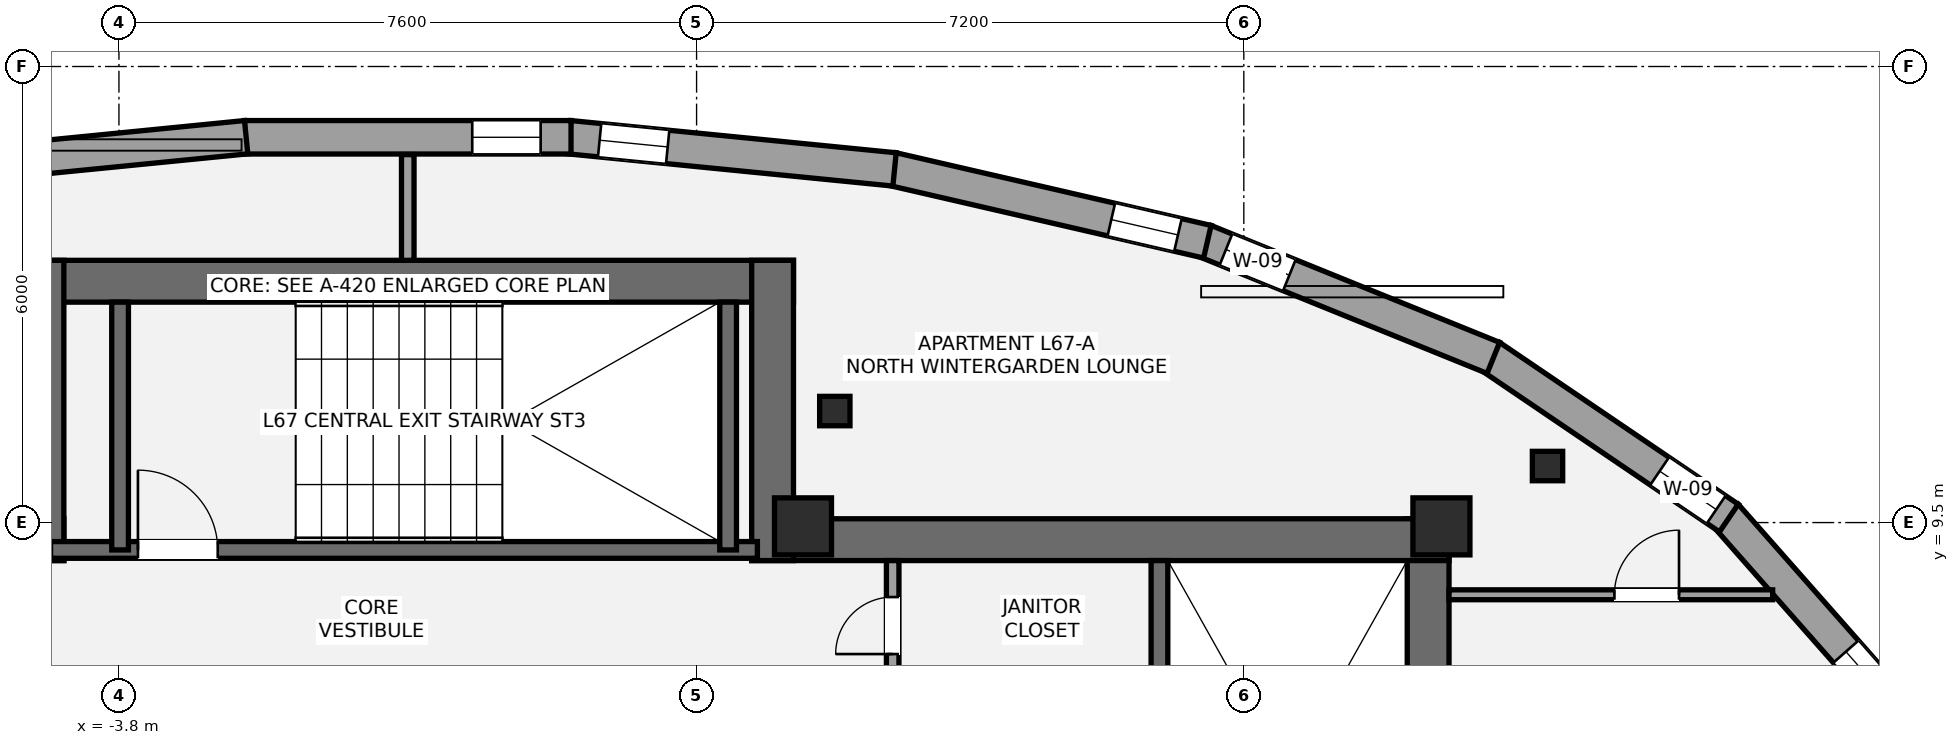
"""IFC4 building model, lengths in metres.
Left out: names, types, materials, properties, quantities, classifications, styles, units other than length and angle.
Written with IfcOpenShell. Run it as: python <this file> out.ifc"""

import sys

from ifc_helpers import new_model, si_unit, direction, frame, frame_2d, origin, origin_2d, place, context, subcontext, project, spatial, rectangle, i_section, extrude, element, fill, save


model = new_model("IFC4")
c1 = context("Model", 3, precision=1e-05, world=origin(), true_north=direction((0.0, 1.0)))
c2 = subcontext(c1, "Body", "Model", "MODEL_VIEW")
j1 = project(units=[si_unit("LENGTHUNIT", "METRE"), si_unit("PLANEANGLEUNIT", "RADIAN")], contexts=[c1])
p1 = place(None, origin())
s1 = spatial("IfcSite", under=j1, at=p1, CompositionType="ELEMENT")
p2 = place(p1, origin())
s2 = spatial("IfcBuilding", under=s1, at=p2, CompositionType="ELEMENT")
p3 = place(p2, frame((0.0, 0.0, 238.35)))
s3 = spatial("IfcBuildingStorey", under=s2, at=p3, CompositionType="ELEMENT", Elevation=238.35)
p4 = place(p3, frame((-13.7, 9.275, 0.0), z_axis=(0.0, 0.0, 1.0), x_axis=(1.0, 0.0, 0.0)))
e1 = element("IfcWall", 1, at=p4, inside=s3, PredefinedType="SHEAR", context=c2, shape_type="SweptSolid", body=[
    extrude(rectangle(XDim=9.175, YDim=0.55, at=frame_2d((4.587, 0.0))), origin(), (0.0, 0.0, 1.0), 3.15),
])
p5 = place(p3, frame((13.425, 1.3, 0.0), z_axis=(0.0, 0.0, 1.0), x_axis=(0.0, 1.0, 0.0)))
e2 = element("IfcWall", 2, at=p5, inside=s3, PredefinedType="SHEAR", context=c2, shape_type="SweptSolid", body=[
    extrude(rectangle(XDim=8.25, YDim=0.55, at=frame_2d((4.125, 0.0))), origin(), (0.0, 0.0, 1.0), 3.15),
])
p6 = place(p3, frame((4.525, 9.275, 0.0), z_axis=(0.0, 0.0, 1.0), x_axis=(1.0, 0.0, 0.0)))
e3 = element("IfcWall", 3, at=p6, inside=s3, PredefinedType="SHEAR", context=c2, shape_type="SweptSolid", body=[
    extrude(rectangle(XDim=9.175, YDim=0.55, at=frame_2d((4.587, 0.0))), origin(), (0.0, 0.0, 1.0), 3.15),
])
p7 = place(p3, frame((9.89, 1.85, 0.0), z_axis=(0.0, 0.0, 1.0), x_axis=(0.0, 1.0, 0.0)))
e4 = element("IfcWall", 4, at=p7, inside=s3, PredefinedType="SHEAR", context=c2, shape_type="SweptSolid", body=[
    extrude(rectangle(XDim=7.15, YDim=0.22, at=frame_2d((3.575, 0.0))), origin(), (0.0, 0.0, 1.0), 3.15),
])
p8 = place(p3, frame((-5.075, 12.675, 0.0), z_axis=(0.0, 0.0, 1.0), x_axis=(1.0, 0.0, 0.0)))
e5 = element("IfcWall", 5, at=p8, inside=s3, PredefinedType="SHEAR", context=c2, shape_type="SweptSolid", body=[
    extrude(rectangle(XDim=10.15, YDim=0.55, at=frame_2d((5.075, 0.0))), origin(), (0.0, 0.0, 1.0), 3.15),
])
for number, where, z_axis, x_axis in (
    (6, (-4.8, 9.0, 0.0), (0.0, 0.0, 1.0), (0.0, 1.0, 0.0)),
    (7, (4.8, 9.0, 0.0), (0.0, 0.0, 1.0), (0.0, 1.0, 0.0)),
):
    element("IfcWall", number, at=place(p3, frame(where, z_axis=z_axis, x_axis=x_axis)), inside=s3, PredefinedType="SHEAR", context=c2, shape_type="SweptSolid", body=[
        extrude(rectangle(XDim=3.95, YDim=0.55, at=frame_2d((1.975, 0.0))), origin(), (0.0, 0.0, 1.0), 3.15),
    ])
p9 = place(p3, frame((-4.7, 9.14, 0.0), z_axis=(0.0, 0.0, 1.0), x_axis=(1.0, 0.0, 0.0)))
e8 = element("IfcWall", 8, at=p9, inside=s3, PredefinedType="SHEAR", context=c2, shape_type="SweptSolid", body=[
    extrude(rectangle(XDim=9.3, YDim=0.22, at=frame_2d((4.65, 0.0))), origin(), (0.0, 0.0, 1.0), 3.15),
])
p10 = place(p9, frame((1.15, 0.0, 0.0)))
e9 = element("IfcOpeningElement", 9, at=p10, cuts=e8, PredefinedType="OPENING", context=c2, shape_type="SweptSolid", body=[
    extrude(rectangle(XDim=1.05, YDim=2.15, at=frame_2d((0.525, 1.075))), frame((0.0, 0.12, 0.0), z_axis=(0.0, -1.0, 0.0), x_axis=(1.0, 0.0, 0.0)), (0.0, 0.0, 1.0), 0.24),
])
for number, where, z_axis, x_axis in (
    (10, (-3.785, 9.14, 0.0), (0.0, 0.0, 1.0), (0.0, 1.0, 0.0)),
    (11, (4.215, 9.14, 0.0), (0.0, 0.0, 1.0), (0.0, 1.0, 0.0)),
):
    element("IfcWall", number, at=place(p3, frame(where, z_axis=z_axis, x_axis=x_axis)), inside=s3, PredefinedType="SHEAR", context=c2, shape_type="SweptSolid", body=[
        extrude(rectangle(XDim=3.26, YDim=0.22, at=frame_2d((1.63, 0.0))), origin(), (0.0, 0.0, 1.0), 3.15),
    ])
for number, where, z_axis, x_axis in (
    (12, (5.2, 9.45, 0.0), (0.0, 0.0, 1.0), (1.0, 0.0, 0.0)),
    (13, (13.6, 9.45, 0.0), (0.0, 0.0, 1.0), (1.0, 0.0, 0.0)),
):
    element("IfcColumn", number, at=place(p3, frame(where, z_axis=z_axis, x_axis=x_axis)), inside=s3, PredefinedType="PILASTER", context=c2, shape_type="SweptSolid", body=[
        extrude(rectangle(XDim=0.75, YDim=0.75, at=origin_2d()), origin(), (0.0, 0.0, 1.0), 3.15),
    ])
for number, where, z_axis, x_axis in (
    (14, (14.996, 10.244, 0.0), (0.0, 0.0, 1.0), (1.0, 0.0, 0.0)),
    (15, (5.619, 10.967, 0.0), (0.0, 0.0, 1.0), (1.0, 0.0, 0.0)),
):
    element("IfcColumn", number, at=place(p3, frame(where, z_axis=z_axis, x_axis=x_axis)), inside=s3, PredefinedType="COLUMN", context=c2, shape_type="SweptSolid", body=[
        extrude(i_section(OverallWidth=0.399, OverallDepth=0.387, WebThickness=0.021, FlangeThickness=0.033, at=origin_2d()), origin(), (0.0, 0.0, 1.0), 3.15),
    ])
p11 = place(p3, frame((17.34, 9.596, 0.0), z_axis=(0.0, 0.0, 1.0), x_axis=(0.66136043846, -0.750068243855, 0.0)))
e16 = element("IfcWall", 16, at=p11, inside=s3, PredefinedType="STANDARD", context=c2, shape_type="SweptSolid", body=[
    extrude(rectangle(XDim=3.432, YDim=0.44, at=frame_2d((1.716, 0.0))), origin(), (0.0, 0.0, 1.0), 2.336),
])
p12 = place(p11, frame((2.392, 0.0, 0.88)))
e17 = element("IfcOpeningElement", 17, at=p12, cuts=e16, PredefinedType="OPENING", context=c2, shape_type="SweptSolid", body=[
    extrude(rectangle(XDim=0.9, YDim=1.35, at=frame_2d((0.45, 0.675))), frame((0.0, 0.23, 0.0), z_axis=(0.0, -1.0, 0.0), x_axis=(1.0, 0.0, 0.0)), (0.0, 0.0, 1.0), 0.46),
])
p13 = place(p3, frame((14.242, 11.688, 0.0), z_axis=(0.0, 0.0, 1.0), x_axis=(0.827637036896, -0.561263694851, 0.0)))
e18 = element("IfcWall", 18, at=p13, inside=s3, PredefinedType="STANDARD", context=c2, shape_type="SweptSolid", body=[
    extrude(rectangle(XDim=3.793, YDim=0.44, at=frame_2d((1.896, 0.0))), origin(), (0.0, 0.0, 1.0), 2.336),
])
p14 = place(p13, frame((2.693, 0.0, 0.58)))
e19 = element("IfcOpeningElement", 19, at=p14, cuts=e18, PredefinedType="OPENING", context=c2, shape_type="SweptSolid", body=[
    extrude(rectangle(XDim=0.9, YDim=1.35, at=frame_2d((0.45, 0.675))), frame((0.0, 0.23, 0.0), z_axis=(0.0, -1.0, 0.0), x_axis=(1.0, 0.0, 0.0)), (0.0, 0.0, 1.0), 0.46),
])
p15 = place(p3, frame((10.487, 13.205, 0.0), z_axis=(0.0, 0.0, 1.0), x_axis=(0.926731976866, -0.375723093586, 0.0)))
e20 = element("IfcWall", 20, at=p15, inside=s3, PredefinedType="STANDARD", context=c2, shape_type="SweptSolid", body=[
    extrude(rectangle(XDim=4.096, YDim=0.44, at=frame_2d((2.048, 0.0))), origin(), (0.0, 0.0, 1.0), 2.336),
])
p16 = place(p15, frame((0.3, 0.0, 0.58)))
e21 = element("IfcOpeningElement", 21, at=p16, cuts=e20, PredefinedType="OPENING", context=c2, shape_type="SweptSolid", body=[
    extrude(rectangle(XDim=0.9, YDim=1.35, at=frame_2d((0.45, 0.675))), frame((0.0, 0.23, 0.0), z_axis=(0.0, -1.0, 0.0), x_axis=(1.0, 0.0, 0.0)), (0.0, 0.0, 1.0), 0.46),
])
p17 = place(p3, frame((6.377, 14.151, 0.0), z_axis=(0.0, 0.0, 1.0), x_axis=(0.974398936081, -0.224825962391, 0.0)))
e22 = element("IfcWall", 22, at=p17, inside=s3, PredefinedType="STANDARD", context=c2, shape_type="SweptSolid", body=[
    extrude(rectangle(XDim=4.252, YDim=0.44, at=frame_2d((2.126, 0.0))), origin(), (0.0, 0.0, 1.0), 2.336),
])
p18 = place(p17, frame((2.956, 0.0, 0.58)))
e23 = element("IfcOpeningElement", 23, at=p18, cuts=e22, PredefinedType="OPENING", context=c2, shape_type="SweptSolid", body=[
    extrude(rectangle(XDim=0.9, YDim=1.35, at=frame_2d((0.45, 0.675))), frame((0.0, 0.23, 0.0), z_axis=(0.0, -1.0, 0.0), x_axis=(1.0, 0.0, 0.0)), (0.0, 0.0, 1.0), 0.46),
])
p19 = place(p3, frame((2.126, 14.57, 0.0), z_axis=(0.0, 0.0, 1.0), x_axis=(0.995134540264, -0.098525361068, 0.0)))
e24 = element("IfcWall", 24, at=p19, inside=s3, PredefinedType="STANDARD", context=c2, shape_type="SweptSolid", body=[
    extrude(rectangle(XDim=4.299, YDim=0.44, at=frame_2d((2.15, 0.0))), origin(), (0.0, 0.0, 1.0), 2.336),
])
p20 = place(p19, frame((0.4, 0.0, 0.58)))
e25 = element("IfcOpeningElement", 25, at=p20, cuts=e24, PredefinedType="OPENING", context=c2, shape_type="SweptSolid", body=[
    extrude(rectangle(XDim=0.9, YDim=1.35, at=frame_2d((0.45, 0.675))), frame((0.0, 0.23, 0.0), z_axis=(0.0, -1.0, 0.0), x_axis=(1.0, 0.0, 0.0)), (0.0, 0.0, 1.0), 0.46),
])
p21 = place(p3, frame((-2.148, 14.569, 0.0), z_axis=(0.0, 0.0, 1.0), x_axis=(1.0, 0.0, 0.0)))
e26 = element("IfcWall", 26, at=p21, inside=s3, PredefinedType="STANDARD", context=c2, shape_type="SweptSolid", body=[
    extrude(rectangle(XDim=4.296, YDim=0.44, at=frame_2d((2.148, 0.0))), origin(), (0.0, 0.0, 1.0), 2.336),
])
p22 = place(p21, frame((2.996, 0.0, 0.58)))
e27 = element("IfcOpeningElement", 27, at=p22, cuts=e26, PredefinedType="OPENING", context=c2, shape_type="SweptSolid", body=[
    extrude(rectangle(XDim=0.9, YDim=1.35, at=frame_2d((0.45, 0.675))), frame((0.0, 0.23, 0.0), z_axis=(0.0, -1.0, 0.0), x_axis=(1.0, 0.0, 0.0)), (0.0, 0.0, 1.0), 0.46),
])
p23 = place(p3, frame((-6.405, 14.146, 0.0), z_axis=(0.0, 0.0, 1.0), x_axis=(0.995134540264, 0.098525361068, 0.0)))
e28 = element("IfcWall", 28, at=p23, inside=s3, PredefinedType="STANDARD", context=c2, shape_type="SweptSolid", body=[
    extrude(rectangle(XDim=4.299, YDim=0.44, at=frame_2d((2.15, 0.0))), origin(), (0.0, 0.0, 1.0), 2.336),
])
p24 = place(p23, frame((0.4, 0.0, 0.58)))
e29 = element("IfcOpeningElement", 29, at=p24, cuts=e28, PredefinedType="OPENING", context=c2, shape_type="SweptSolid", body=[
    extrude(rectangle(XDim=0.9, YDim=1.35, at=frame_2d((0.45, 0.675))), frame((0.0, 0.23, 0.0), z_axis=(0.0, -1.0, 0.0), x_axis=(1.0, 0.0, 0.0)), (0.0, 0.0, 1.0), 0.46),
])
p25 = place(p3, frame((6.38, 7.42, 0.0), z_axis=(0.0, 0.0, 1.0), x_axis=(0.0, 1.0, 0.0)))
e30 = element("IfcWall", 30, at=p25, inside=s3, PredefinedType="PARTITIONING", context=c2, shape_type="SweptSolid", body=[
    extrude(rectangle(XDim=1.58, YDim=0.165, at=frame_2d((0.79, 0.0))), origin(), (0.0, 0.0, 1.0), 2.97),
])
p26 = place(p25, frame((0.35, 0.0, 0.0)))
e31 = element("IfcOpeningElement", 31, at=p26, cuts=e30, PredefinedType="OPENING", context=c2, shape_type="SweptSolid", body=[
    extrude(rectangle(XDim=0.75, YDim=2.1, at=frame_2d((0.375, 1.05))), frame((0.0, 0.093, 0.0), z_axis=(0.0, -1.0, 0.0), x_axis=(1.0, 0.0, 0.0)), (0.0, 0.0, 1.0), 0.185),
])
p27 = place(p3, frame((0.0, 12.95, 0.0), z_axis=(0.0, 0.0, 1.0), x_axis=(0.0, 1.0, 0.0)))
e32 = element("IfcWall", 32, at=p27, inside=s3, PredefinedType="PARTITIONING", context=c2, shape_type="SweptSolid", body=[
    extrude(rectangle(XDim=1.391, YDim=0.165, at=frame_2d((0.695, 0.0))), origin(), (0.0, 0.0, 1.0), 2.97),
])
p28 = place(p3, frame((13.7, 8.55, 0.0), z_axis=(0.0, 0.0, 1.0), x_axis=(1.0, 0.0, 0.0)))
e33 = element("IfcWall", 33, at=p28, inside=s3, PredefinedType="PARTITIONING", context=c2, shape_type="SweptSolid", body=[
    extrude(rectangle(XDim=4.258, YDim=0.13, at=frame_2d((2.129, 0.0))), origin(), (0.0, 0.0, 1.0), 2.423),
])
p29 = place(p28, frame((2.176, 0.0, 0.0)))
e34 = element("IfcOpeningElement", 34, at=p29, cuts=e33, PredefinedType="OPENING", context=c2, shape_type="SweptSolid", body=[
    extrude(rectangle(XDim=0.85, YDim=2.1, at=frame_2d((0.425, 1.05))), frame((0.0, 0.075, 0.0), z_axis=(0.0, -1.0, 0.0), x_axis=(1.0, 0.0, 0.0)), (0.0, 0.0, 1.0), 0.15),
])
p30 = place(p14, origin())
e35 = element("IfcWindow", 35, at=p30, inside=s3, PartitioningType="SINGLE_PANEL", PredefinedType="WINDOW", context=c2, shape_type="SweptSolid", body=[
    extrude(rectangle(XDim=0.9, YDim=1.35, at=frame_2d((0.45, 0.675))), frame((0.0, -0.01, 0.0), z_axis=(0.0, -1.0, 0.0), x_axis=(1.0, 0.0, 0.0)), (0.0, 0.0, 1.0), 0.06),
])
fill(e19, e35)
p31 = place(p16, origin())
e36 = element("IfcWindow", 36, at=p31, inside=s3, PartitioningType="SINGLE_PANEL", PredefinedType="WINDOW", context=c2, shape_type="SweptSolid", body=[
    extrude(rectangle(XDim=0.9, YDim=1.35, at=frame_2d((0.45, 0.675))), frame((0.0, -0.01, 0.0), z_axis=(0.0, -1.0, 0.0), x_axis=(1.0, 0.0, 0.0)), (0.0, 0.0, 1.0), 0.06),
])
fill(e21, e36)
p32 = place(p18, origin())
e37 = element("IfcWindow", 37, at=p32, inside=s3, PartitioningType="SINGLE_PANEL", PredefinedType="WINDOW", context=c2, shape_type="SweptSolid", body=[
    extrude(rectangle(XDim=0.9, YDim=1.35, at=frame_2d((0.45, 0.675))), frame((0.0, -0.01, 0.0), z_axis=(0.0, -1.0, 0.0), x_axis=(1.0, 0.0, 0.0)), (0.0, 0.0, 1.0), 0.06),
])
fill(e23, e37)
p33 = place(p20, origin())
e38 = element("IfcWindow", 38, at=p33, inside=s3, PartitioningType="SINGLE_PANEL", PredefinedType="WINDOW", context=c2, shape_type="SweptSolid", body=[
    extrude(rectangle(XDim=0.9, YDim=1.35, at=frame_2d((0.45, 0.675))), frame((0.0, -0.01, 0.0), z_axis=(0.0, -1.0, 0.0), x_axis=(1.0, 0.0, 0.0)), (0.0, 0.0, 1.0), 0.06),
])
fill(e25, e38)
p34 = place(p22, origin())
e39 = element("IfcWindow", 39, at=p34, inside=s3, PartitioningType="SINGLE_PANEL", PredefinedType="WINDOW", context=c2, shape_type="SweptSolid", body=[
    extrude(rectangle(XDim=0.9, YDim=1.35, at=frame_2d((0.45, 0.675))), frame((0.0, -0.01, 0.0), z_axis=(0.0, -1.0, 0.0), x_axis=(1.0, 0.0, 0.0)), (0.0, 0.0, 1.0), 0.06),
])
fill(e27, e39)
p35 = place(p12, origin())
e40 = element("IfcWindow", 40, at=p35, inside=s3, PartitioningType="SINGLE_PANEL", PredefinedType="WINDOW", context=c2, shape_type="SweptSolid", body=[
    extrude(rectangle(XDim=0.9, YDim=1.35, at=frame_2d((0.45, 0.675))), frame((0.0, -0.01, 0.0), z_axis=(0.0, -1.0, 0.0), x_axis=(1.0, 0.0, 0.0)), (0.0, 0.0, 1.0), 0.06),
])
fill(e17, e40)
p36 = place(p10, origin())
e41 = element("IfcDoor", 41, at=p36, inside=s3, OperationType="SINGLE_SWING_LEFT", PredefinedType="DOOR", context=c2, shape_type="SweptSolid", body=[
    extrude(rectangle(XDim=1.05, YDim=2.15, at=frame_2d((0.525, 1.075))), frame((0.0, 0.025, 0.0), z_axis=(0.0, -1.0, 0.0), x_axis=(1.0, 0.0, 0.0)), (0.0, 0.0, 1.0), 0.05),
])
fill(e9, e41)
p37 = place(p26, origin())
e42 = element("IfcDoor", 42, at=p37, inside=s3, OperationType="SINGLE_SWING_LEFT", PredefinedType="DOOR", context=c2, shape_type="SweptSolid", body=[
    extrude(rectangle(XDim=0.75, YDim=2.1, at=frame_2d((0.375, 1.05))), frame((0.0, 0.025, 0.0), z_axis=(0.0, -1.0, 0.0), x_axis=(1.0, 0.0, 0.0)), (0.0, 0.0, 1.0), 0.05),
])
fill(e31, e42)
p38 = place(p29, origin())
e43 = element("IfcDoor", 43, at=p38, inside=s3, OperationType="SINGLE_SWING_RIGHT", PredefinedType="DOOR", context=c2, shape_type="SweptSolid", body=[
    extrude(rectangle(XDim=0.85, YDim=2.1, at=frame_2d((0.425, 1.05))), frame((0.0, 0.025, 0.0), z_axis=(0.0, -1.0, 0.0), x_axis=(1.0, 0.0, 0.0)), (0.0, 0.0, 1.0), 0.05),
])
fill(e34, e43)
save(model, sys.argv[1])
